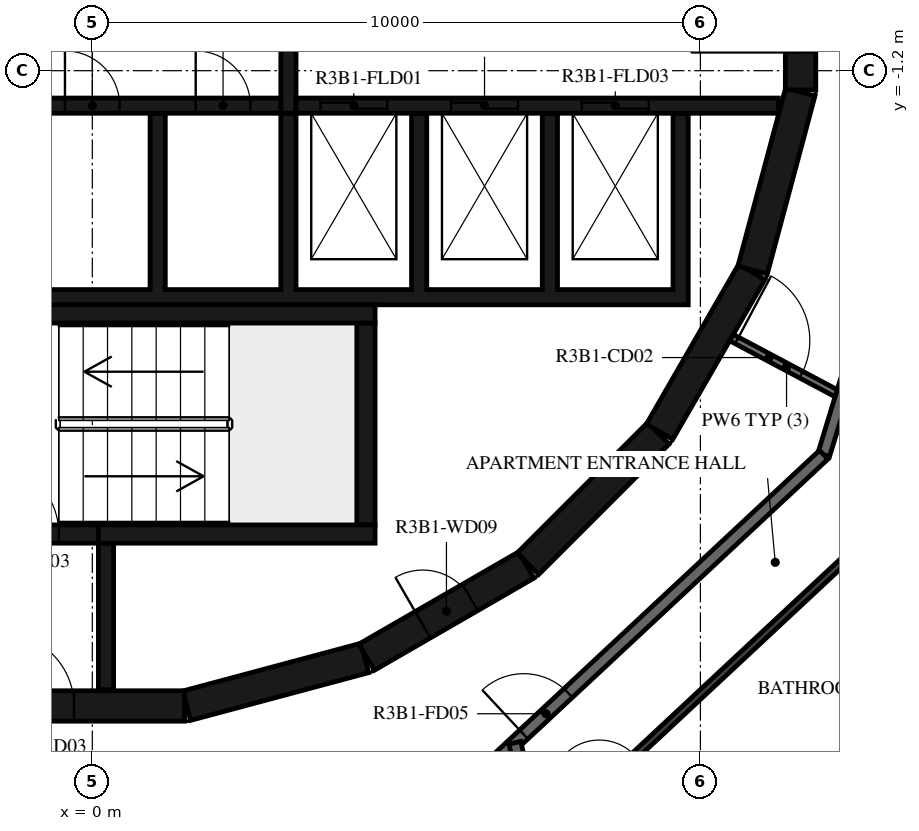
"""IFC4 building model, lengths in metres.
Left out: names, types, materials, properties, quantities, classifications, styles, units other than length and angle.
Written with IfcOpenShell. Run it as: python <this file> out.ifc"""

import sys

from ifc_helpers import new_model, si_unit, direction, frame, frame_2d, origin, place, context, subcontext, project, spatial, polyline, rectangle, outline, extrude, element, fill, save


model = new_model("IFC4")
c1 = context("Model", 3, precision=1e-05, world=origin(), true_north=direction((0.0, 1.0)))
c2 = subcontext(c1, "Body", "Model", "MODEL_VIEW")
j1 = project(units=[si_unit("LENGTHUNIT", "METRE"), si_unit("PLANEANGLEUNIT", "RADIAN")], contexts=[c1])
p1 = place(None, origin())
s1 = spatial("IfcSite", under=j1, at=p1, CompositionType="ELEMENT")
p2 = place(p1, origin())
s2 = spatial("IfcBuilding", under=s1, at=p2, CompositionType="ELEMENT")
p3 = place(p2, frame((0.0, 0.0, 123.9)))
s3 = spatial("IfcBuildingStorey", under=s2, at=p3, CompositionType="ELEMENT", Elevation=123.9)
p4 = place(p3, frame((1.55, -11.643, 0.0), z_axis=(0.0, 0.0, 1.0), x_axis=(0.965948410781, 0.258734743916, 0.0)))
e1 = element("IfcWall", 1, at=p4, inside=s3, PredefinedType="SHEAR", context=c2, shape_type="SweptSolid", body=[
    extrude(rectangle(XDim=3.033, YDim=0.5, at=frame_2d((1.516, 0.0))), origin(), (0.0, 0.0, 1.0), 3.12),
])
p5 = place(p3, frame((4.51, -10.845, 0.0), z_axis=(0.0, 0.0, 1.0), x_axis=(0.865975092491, 0.500087131594, 0.0)))
e2 = element("IfcWall", 2, at=p5, inside=s3, PredefinedType="SHEAR", context=c2, shape_type="SweptSolid", body=[
    extrude(rectangle(XDim=3.033, YDim=0.5, at=frame_2d((1.516, 0.0))), origin(), (0.0, 0.0, 1.0), 3.12),
])
p6 = place(p5, frame((1.066, 0.0, 0.0)))
e3 = element("IfcOpeningElement", 3, at=p6, cuts=e2, PredefinedType="OPENING", context=c2, shape_type="SweptSolid", body=[
    extrude(rectangle(XDim=0.9, YDim=2.1, at=frame_2d((0.45, 1.05))), frame((0.0, 0.26, 0.0), z_axis=(0.0, -1.0, 0.0), x_axis=(1.0, 0.0, 0.0)), (0.0, 0.0, 1.0), 0.52),
])
p7 = place(p3, frame((7.164, -9.308, 0.0), z_axis=(0.0, 0.0, 1.0), x_axis=(0.707106781187, 0.707106781187, 0.0)))
e4 = element("IfcWall", 4, at=p7, inside=s3, PredefinedType="SHEAR", context=c2, shape_type="SweptSolid", body=[
    extrude(rectangle(XDim=3.032, YDim=0.5, at=frame_2d((1.516, 0.0))), origin(), (0.0, 0.0, 1.0), 3.12),
])
for number, where, z_axis, x_axis in (
    (5, (9.329, -7.137, 0.0), (0.0, 0.0, 1.0), (0.5, 0.866, 0.0)),
    (6, (10.858, -4.479, 0.0), (0.0, 0.0, 1.0), (0.259, 0.966, 0.0)),
):
    element("IfcWall", number, at=place(p3, frame(where, z_axis=z_axis, x_axis=x_axis)), inside=s3, PredefinedType="SHEAR", context=c2, shape_type="SweptSolid", body=[
        extrude(rectangle(XDim=3.033, YDim=0.5, at=frame_2d((1.516, 0.0))), origin(), (0.0, 0.0, 1.0), 3.12),
    ])
p8 = place(p3, frame((11.647, -1.516, 0.0), z_axis=(0.0, 0.0, 1.0), x_axis=(0.0, 1.0, 0.0)))
e7 = element("IfcWall", 7, at=p8, inside=s3, PredefinedType="SHEAR", context=c2, shape_type="SweptSolid", body=[
    extrude(rectangle(XDim=3.033, YDim=0.5, at=frame_2d((1.516, 0.0))), origin(), (0.0, 0.0, 1.0), 3.12),
])
p9 = place(p8, frame((0.616, 0.0, 0.0)))
e8 = element("IfcOpeningElement", 8, at=p9, cuts=e7, PredefinedType="OPENING", context=c2, shape_type="SweptSolid", body=[
    extrude(rectangle(XDim=1.8, YDim=2.1, at=frame_2d((0.9, 1.05))), frame((0.0, 0.26, 0.0), z_axis=(0.0, -1.0, 0.0), x_axis=(1.0, 0.0, 0.0)), (0.0, 0.0, 1.0), 0.52),
])
p10 = place(p3, frame((-1.516, -11.647, 0.0), z_axis=(0.0, 0.0, 1.0), x_axis=(1.0, 0.0, 0.0)))
e9 = element("IfcWall", 9, at=p10, inside=s3, PredefinedType="SHEAR", context=c2, shape_type="SweptSolid", body=[
    extrude(rectangle(XDim=3.033, YDim=0.5, at=frame_2d((1.516, 0.0))), origin(), (0.0, 0.0, 1.0), 3.12),
])
p11 = place(p10, frame((0.016, 0.0, 0.0)))
e10 = element("IfcOpeningElement", 10, at=p11, cuts=e9, PredefinedType="OPENING", context=c2, shape_type="SweptSolid", body=[
    extrude(rectangle(XDim=1.2, YDim=2.1, at=frame_2d((0.6, 1.05))), frame((0.0, 0.26, 0.0), z_axis=(0.0, -1.0, 0.0), x_axis=(1.0, 0.0, 0.0)), (0.0, 0.0, 1.0), 0.52),
])
p12 = place(p3, frame((-2.4, -5.2, 0.0), z_axis=(0.0, 0.0, 1.0), x_axis=(1.0, 0.0, 0.0)))
e11 = element("IfcWall", 11, at=p12, inside=s3, PredefinedType="SHEAR", context=c2, shape_type="SweptSolid", body=[
    extrude(rectangle(XDim=7.05, YDim=0.3, at=frame_2d((3.525, 0.0))), origin(), (0.0, 0.0, 1.0), 3.12),
])
p13 = place(p3, frame((4.5, -8.67, 0.0), z_axis=(0.0, 0.0, 1.0), x_axis=(0.0, 1.0, 0.0)))
e12 = element("IfcWall", 12, at=p13, inside=s3, PredefinedType="SHEAR", context=c2, shape_type="SweptSolid", body=[
    extrude(rectangle(XDim=3.32, YDim=0.3, at=frame_2d((1.66, 0.0))), origin(), (0.0, 0.0, 1.0), 3.12),
])
p14 = place(p3, frame((0.1, -8.82, 0.0), z_axis=(0.0, 0.0, 1.0), x_axis=(1.0, 0.0, 0.0)))
e13 = element("IfcWall", 13, at=p14, inside=s3, PredefinedType="SHEAR", context=c2, shape_type="SweptSolid", body=[
    extrude(rectangle(XDim=4.55, YDim=0.3, at=frame_2d((2.275, 0.0))), origin(), (0.0, 0.0, 1.0), 3.12),
])
p15 = place(p3, frame((-2.4, -8.82, 0.0), z_axis=(0.0, 0.0, 1.0), x_axis=(1.0, 0.0, 0.0)))
e14 = element("IfcWall", 14, at=p15, inside=s3, PredefinedType="SHEAR", context=c2, shape_type="SweptSolid", body=[
    extrude(rectangle(XDim=2.5, YDim=0.3, at=frame_2d((1.25, 0.0))), origin(), (0.0, 0.0, 1.0), 3.12),
])
p16 = place(p15, frame((0.65, 0.0, 0.0)))
e15 = element("IfcOpeningElement", 15, at=p16, cuts=e14, PredefinedType="OPENING", context=c2, shape_type="SweptSolid", body=[
    extrude(rectangle(XDim=1.2, YDim=2.1, at=frame_2d((0.6, 1.05))), frame((0.0, 0.16, 0.0), z_axis=(0.0, -1.0, 0.0), x_axis=(1.0, 0.0, 0.0)), (0.0, 0.0, 1.0), 0.32),
])
p17 = place(p3, frame((0.225, -8.97, 0.0), z_axis=(0.0, 0.0, 1.0), x_axis=(0.0, -1.0, 0.0)))
e16 = element("IfcWall", 16, at=p17, inside=s3, PredefinedType="SHEAR", context=c2, shape_type="SweptSolid", body=[
    extrude(rectangle(XDim=2.41, YDim=0.25, at=frame_2d((1.205, 0.0))), origin(), (0.0, 0.0, 1.0), 3.12),
])
p18 = place(p3, origin())
e17 = element("IfcWall", 17, at=p18, inside=s3, PredefinedType="SHEAR", context=c2, shape_type="SweptSolid", body=[
    extrude(outline(polyline([(9.8, -5.05), (9.8, -4.8), (9.8, -1.9), (9.55, -1.9), (9.55, -4.8), (7.65, -4.8), (7.65, -1.9), (7.4, -1.9), (7.4, -4.8), (5.5, -4.8), (5.5, -1.9), (5.25, -1.9), (5.25, -4.8), (3.35, -4.8), (3.35, -1.9), (3.1, -1.9), (3.1, -4.8), (1.2, -4.8), (1.2, -1.9), (0.95, -1.9), (0.95, -4.8), (-0.95, -4.8), (-0.95, -1.9), (-1.2, -1.9), (-1.2, -4.8), (-5.25, -4.8), (-5.25, -1.9), (-5.5, -1.9), (-5.5, -4.8), (-7.4, -4.8), (-7.4, -1.9), (-7.65, -1.9), (-7.65, -4.8), (-9.55, -4.8), (-9.55, -1.9), (-9.8, -1.9), (-9.8, -4.8), (-9.8, -5.05), (9.8, -5.05)])), origin(), (0.0, 0.0, 1.0), 3.12),
])
p19 = place(p3, frame((-11.28, -1.775, 0.0), z_axis=(0.0, 0.0, 1.0), x_axis=(1.0, 0.0, 0.0)))
e18 = element("IfcWall", 18, at=p19, inside=s3, PredefinedType="SHEAR", context=c2, shape_type="SweptSolid", body=[
    extrude(rectangle(XDim=14.38, YDim=0.25, at=frame_2d((7.19, 0.0))), origin(), (0.0, 0.0, 1.0), 3.12),
])
p20 = place(p19, frame((7.605, 0.0, 0.0)))
e19 = element("IfcOpeningElement", 19, at=p20, cuts=e18, PredefinedType="OPENING", context=c2, shape_type="SweptSolid", body=[
    extrude(rectangle(XDim=0.9, YDim=2.1, at=frame_2d((0.45, 1.05))), frame((0.0, 0.135, 0.0), z_axis=(0.0, -1.0, 0.0), x_axis=(1.0, 0.0, 0.0)), (0.0, 0.0, 1.0), 0.27),
])
p21 = place(p19, frame((10.83, 0.0, 0.0)))
e20 = element("IfcOpeningElement", 20, at=p21, cuts=e18, PredefinedType="OPENING", context=c2, shape_type="SweptSolid", body=[
    extrude(rectangle(XDim=0.9, YDim=2.1, at=frame_2d((0.45, 1.05))), frame((0.0, 0.135, 0.0), z_axis=(0.0, -1.0, 0.0), x_axis=(1.0, 0.0, 0.0)), (0.0, 0.0, 1.0), 0.27),
])
p22 = place(p19, frame((12.98, 0.0, 0.0)))
e21 = element("IfcOpeningElement", 21, at=p22, cuts=e18, PredefinedType="OPENING", context=c2, shape_type="SweptSolid", body=[
    extrude(rectangle(XDim=0.9, YDim=2.1, at=frame_2d((0.45, 1.05))), frame((0.0, 0.135, 0.0), z_axis=(0.0, -1.0, 0.0), x_axis=(1.0, 0.0, 0.0)), (0.0, 0.0, 1.0), 0.27),
])
p23 = place(p3, frame((3.35, -1.775, 0.0), z_axis=(0.0, 0.0, 1.0), x_axis=(1.0, 0.0, 0.0)))
e22 = element("IfcWall", 22, at=p23, inside=s3, PredefinedType="SHEAR", context=c2, shape_type="SweptSolid", body=[
    extrude(rectangle(XDim=7.93, YDim=0.25, at=frame_2d((3.965, 0.0))), origin(), (0.0, 0.0, 1.0), 3.12),
])
p24 = place(p23, frame((0.4, 0.0, 0.0)))
e23 = element("IfcOpeningElement", 23, at=p24, cuts=e22, PredefinedType="OPENING", context=c2, shape_type="SweptSolid", body=[
    extrude(rectangle(XDim=1.1, YDim=2.4, at=frame_2d((0.55, 1.2))), frame((0.0, 0.135, 0.0), z_axis=(0.0, -1.0, 0.0), x_axis=(1.0, 0.0, 0.0)), (0.0, 0.0, 1.0), 0.27),
])
p25 = place(p23, frame((2.55, 0.0, 0.0)))
e24 = element("IfcOpeningElement", 24, at=p25, cuts=e22, PredefinedType="OPENING", context=c2, shape_type="SweptSolid", body=[
    extrude(rectangle(XDim=1.1, YDim=2.4, at=frame_2d((0.55, 1.2))), frame((0.0, 0.135, 0.0), z_axis=(0.0, -1.0, 0.0), x_axis=(1.0, 0.0, 0.0)), (0.0, 0.0, 1.0), 0.27),
])
p26 = place(p23, frame((4.7, 0.0, 0.0)))
e25 = element("IfcOpeningElement", 25, at=p26, cuts=e22, PredefinedType="OPENING", context=c2, shape_type="SweptSolid", body=[
    extrude(rectangle(XDim=1.1, YDim=2.4, at=frame_2d((0.55, 1.2))), frame((0.0, 0.135, 0.0), z_axis=(0.0, -1.0, 0.0), x_axis=(1.0, 0.0, 0.0)), (0.0, 0.0, 1.0), 0.27),
])
p27 = place(p3, frame((3.225, -1.9, 0.0), z_axis=(0.0, 0.0, 1.0), x_axis=(0.0, 1.0, 0.0)))
e26 = element("IfcWall", 26, at=p27, inside=s3, PredefinedType="SHEAR", context=c2, shape_type="SweptSolid", body=[
    extrude(rectangle(XDim=3.8, YDim=0.25, at=frame_2d((1.9, 0.0))), origin(), (0.0, 0.0, 1.0), 3.12),
])
p28 = place(p3, frame((10.511, -5.589, 0.0), z_axis=(0.0, 0.0, 1.0), x_axis=(0.882987820808, -0.469395897196, 0.0)))
e27 = element("IfcWall", 27, at=p28, inside=s3, PredefinedType="PARTITIONING", context=c2, shape_type="SweptSolid", body=[
    extrude(rectangle(XDim=2.052, YDim=0.12, at=frame_2d((1.026, 0.0))), origin(), (0.0, 0.0, 1.0), 3.12),
])
p29 = place(p28, frame((0.1, 0.0, 0.0)))
e28 = element("IfcOpeningElement", 28, at=p29, cuts=e27, PredefinedType="OPENING", context=c2, shape_type="SweptSolid", body=[
    extrude(rectangle(XDim=1.2, YDim=2.1, at=frame_2d((0.6, 1.05))), frame((0.0, 0.07, 0.0), z_axis=(0.0, -1.0, 0.0), x_axis=(1.0, 0.0, 0.0)), (0.0, 0.0, 1.0), 0.14),
])
p30 = place(p3, frame((12.028, -7.516, 0.0), z_axis=(0.0, 0.0, 1.0), x_axis=(0.292365533182, 0.956306642771, 0.0)))
e29 = element("IfcWall", 29, at=p30, inside=s3, PredefinedType="STANDARD", context=c2, shape_type="SweptSolid", body=[
    extrude(rectangle(XDim=7.342, YDim=0.2, at=frame_2d((3.671, 0.0))), origin(), (0.0, 0.0, 1.0), 3.12),
])
p31 = place(p3, frame((-7.516, -12.028, 0.0), z_axis=(0.0, 0.0, 1.0), x_axis=(0.956306642771, -0.292365533182, 0.0)))
e30 = element("IfcWall", 30, at=p31, inside=s3, PredefinedType="STANDARD", context=c2, shape_type="SweptSolid", body=[
    extrude(rectangle(XDim=7.342, YDim=0.2, at=frame_2d((3.671, 0.0))), origin(), (0.0, 0.0, 1.0), 3.12),
])
p32 = place(p31, frame((6.142, 0.0, 0.0)))
e31 = element("IfcOpeningElement", 31, at=p32, cuts=e30, PredefinedType="OPENING", context=c2, shape_type="SweptSolid", body=[
    extrude(rectangle(XDim=1.0, YDim=2.1, at=frame_2d((0.5, 1.05))), frame((0.0, 0.11, 0.0), z_axis=(0.0, -1.0, 0.0), x_axis=(1.0, 0.0, 0.0)), (0.0, 0.0, 1.0), 0.22),
])
p33 = place(p3, frame((6.659, -12.523, 0.0), z_axis=(0.0, 0.0, 1.0), x_axis=(0.731350455479, 0.682001841105, 0.0)))
e32 = element("IfcWall", 32, at=p33, inside=s3, PredefinedType="STANDARD", context=c2, shape_type="SweptSolid", body=[
    extrude(rectangle(XDim=7.342, YDim=0.2, at=frame_2d((3.671, 0.0))), origin(), (0.0, 0.0, 1.0), 3.12),
])
p34 = place(p33, frame((0.597, 0.0, 0.0)))
e33 = element("IfcOpeningElement", 33, at=p34, cuts=e32, PredefinedType="OPENING", context=c2, shape_type="SweptSolid", body=[
    extrude(rectangle(XDim=1.0, YDim=2.1, at=frame_2d((0.5, 1.05))), frame((0.0, 0.11, 0.0), z_axis=(0.0, -1.0, 0.0), x_axis=(1.0, 0.0, 0.0)), (0.0, 0.0, 1.0), 0.22),
])
p35 = place(p3, frame((7.34, -13.946, 0.0), z_axis=(0.0, 0.0, 1.0), x_axis=(-0.224849249613, 0.974393562658, 0.0)))
e34 = element("IfcWall", 34, at=p35, inside=s3, PredefinedType="STANDARD", context=c2, shape_type="SweptSolid", body=[
    extrude(rectangle(XDim=1.738, YDim=0.2, at=frame_2d((0.869, 0.0))), origin(), (0.0, 0.0, 1.0), 3.12),
])
p36 = place(p3, frame((-13.939, -18.911, 0.0), z_axis=(0.0, 0.0, 1.0), x_axis=(0.974369607456, 0.224953035245, 0.0)))
e35 = element("IfcWall", 35, at=p36, inside=s3, PredefinedType="PARTITIONING", context=c2, shape_type="SweptSolid", body=[
    extrude(rectangle(XDim=33.934, YDim=0.12, at=frame_2d((16.967, 0.0))), origin(), (0.0, 0.0, 1.0), 3.12),
])
p37 = place(p36, frame((2.0, 0.0, 0.0)))
e36 = element("IfcOpeningElement", 36, at=p37, cuts=e35, PredefinedType="OPENING", context=c2, shape_type="SweptSolid", body=[
    extrude(rectangle(XDim=0.9, YDim=2.1, at=frame_2d((0.45, 1.05))), frame((0.0, 0.07, 0.0), z_axis=(0.0, -1.0, 0.0), x_axis=(1.0, 0.0, 0.0)), (0.0, 0.0, 1.0), 0.14),
])
p38 = place(p36, frame((28.154, 0.0, 0.0)))
e37 = element("IfcOpeningElement", 37, at=p38, cuts=e35, PredefinedType="OPENING", context=c2, shape_type="SweptSolid", body=[
    extrude(rectangle(XDim=0.9, YDim=2.1, at=frame_2d((0.45, 1.05))), frame((0.0, 0.07, 0.0), z_axis=(0.0, -1.0, 0.0), x_axis=(1.0, 0.0, 0.0)), (0.0, 0.0, 1.0), 0.14),
])
p39 = place(p36, frame((30.039, 0.0, 0.0)))
e38 = element("IfcOpeningElement", 38, at=p39, cuts=e35, PredefinedType="OPENING", context=c2, shape_type="SweptSolid", body=[
    extrude(rectangle(XDim=0.9, YDim=2.1, at=frame_2d((0.45, 1.05))), frame((0.0, 0.07, 0.0), z_axis=(0.0, -1.0, 0.0), x_axis=(1.0, 0.0, 0.0)), (0.0, 0.0, 1.0), 0.14),
])
p40 = place(p3, frame((7.388, -13.894, 0.0), z_axis=(0.0, 0.0, 1.0), x_axis=(0.731346321845, 0.682006273815, 0.0)))
e39 = element("IfcWall", 39, at=p40, inside=s3, PredefinedType="PARTITIONING", context=c2, shape_type="SweptSolid", body=[
    extrude(rectangle(XDim=7.585, YDim=0.12, at=frame_2d((3.793, 0.0))), origin(), (0.0, 0.0, 1.0), 3.12),
])
p41 = place(p40, frame((1.3, 0.0, 0.0)))
e40 = element("IfcOpeningElement", 40, at=p41, cuts=e39, PredefinedType="OPENING", context=c2, shape_type="SweptSolid", body=[
    extrude(rectangle(XDim=0.8, YDim=2.1, at=frame_2d((0.4, 1.05))), frame((0.0, 0.07, 0.0), z_axis=(0.0, -1.0, 0.0), x_axis=(1.0, 0.0, 0.0)), (0.0, 0.0, 1.0), 0.14),
])
p42 = place(p16, origin())
e41 = element("IfcDoor", 41, at=p42, inside=s3, OperationType="SINGLE_SWING_LEFT", PredefinedType="DOOR", context=c2, shape_type="SweptSolid", body=[
    extrude(rectangle(XDim=1.2, YDim=2.1, at=frame_2d((0.6, 1.05))), frame((0.0, 0.025, 0.0), z_axis=(0.0, -1.0, 0.0), x_axis=(1.0, 0.0, 0.0)), (0.0, 0.0, 1.0), 0.05),
])
fill(e15, e41)
p43 = place(p11, origin())
e42 = element("IfcDoor", 42, at=p43, inside=s3, OperationType="SINGLE_SWING_RIGHT", PredefinedType="DOOR", context=c2, shape_type="SweptSolid", body=[
    extrude(rectangle(XDim=1.2, YDim=2.1, at=frame_2d((0.6, 1.05))), frame((0.0, 0.025, 0.0), z_axis=(0.0, -1.0, 0.0), x_axis=(1.0, 0.0, 0.0)), (0.0, 0.0, 1.0), 0.05),
])
fill(e10, e42)
p44 = place(p9, origin())
e43 = element("IfcDoor", 43, at=p44, inside=s3, OperationType="DOUBLE_DOOR_SINGLE_SWING", PredefinedType="DOOR", context=c2, shape_type="SweptSolid", body=[
    extrude(rectangle(XDim=1.8, YDim=2.1, at=frame_2d((0.9, 1.05))), frame((0.0, 0.025, 0.0), z_axis=(0.0, -1.0, 0.0), x_axis=(1.0, 0.0, 0.0)), (0.0, 0.0, 1.0), 0.05),
])
fill(e8, e43)
p45 = place(p24, origin())
e44 = element("IfcDoor", 44, at=p45, inside=s3, OperationType="DOUBLE_DOOR_SLIDING", PredefinedType="DOOR", context=c2, shape_type="SweptSolid", body=[
    extrude(rectangle(XDim=1.1, YDim=2.4, at=frame_2d((0.55, 1.2))), frame((0.0, 0.025, 0.0), z_axis=(0.0, -1.0, 0.0), x_axis=(1.0, 0.0, 0.0)), (0.0, 0.0, 1.0), 0.05),
])
fill(e23, e44)
p46 = place(p25, origin())
e45 = element("IfcDoor", 45, at=p46, inside=s3, OperationType="DOUBLE_DOOR_SLIDING", PredefinedType="DOOR", context=c2, shape_type="SweptSolid", body=[
    extrude(rectangle(XDim=1.1, YDim=2.4, at=frame_2d((0.55, 1.2))), frame((0.0, 0.025, 0.0), z_axis=(0.0, -1.0, 0.0), x_axis=(1.0, 0.0, 0.0)), (0.0, 0.0, 1.0), 0.05),
])
fill(e24, e45)
p47 = place(p26, origin())
e46 = element("IfcDoor", 46, at=p47, inside=s3, OperationType="DOUBLE_DOOR_SLIDING", PredefinedType="DOOR", context=c2, shape_type="SweptSolid", body=[
    extrude(rectangle(XDim=1.1, YDim=2.4, at=frame_2d((0.55, 1.2))), frame((0.0, 0.025, 0.0), z_axis=(0.0, -1.0, 0.0), x_axis=(1.0, 0.0, 0.0)), (0.0, 0.0, 1.0), 0.05),
])
fill(e25, e46)
p48 = place(p21, origin())
e47 = element("IfcDoor", 47, at=p48, inside=s3, OperationType="SINGLE_SWING_LEFT", PredefinedType="DOOR", context=c2, shape_type="SweptSolid", body=[
    extrude(rectangle(XDim=0.9, YDim=2.1, at=frame_2d((0.45, 1.05))), frame((0.0, 0.025, 0.0), z_axis=(0.0, -1.0, 0.0), x_axis=(1.0, 0.0, 0.0)), (0.0, 0.0, 1.0), 0.05),
])
fill(e20, e47)
p49 = place(p22, origin())
e48 = element("IfcDoor", 48, at=p49, inside=s3, OperationType="SINGLE_SWING_RIGHT", PredefinedType="DOOR", context=c2, shape_type="SweptSolid", body=[
    extrude(rectangle(XDim=0.9, YDim=2.1, at=frame_2d((0.45, 1.05))), frame((0.0, 0.025, 0.0), z_axis=(0.0, -1.0, 0.0), x_axis=(1.0, 0.0, 0.0)), (0.0, 0.0, 1.0), 0.05),
])
fill(e21, e48)
p50 = place(p6, origin())
e49 = element("IfcDoor", 49, at=p50, inside=s3, OperationType="SINGLE_SWING_RIGHT", PredefinedType="DOOR", context=c2, shape_type="SweptSolid", body=[
    extrude(rectangle(XDim=0.9, YDim=2.1, at=frame_2d((0.45, 1.05))), frame((0.0, 0.025, 0.0), z_axis=(0.0, -1.0, 0.0), x_axis=(1.0, 0.0, 0.0)), (0.0, 0.0, 1.0), 0.05),
])
fill(e3, e49)
p51 = place(p34, origin())
e50 = element("IfcDoor", 50, at=p51, inside=s3, OperationType="SINGLE_SWING_RIGHT", PredefinedType="DOOR", context=c2, shape_type="SweptSolid", body=[
    extrude(rectangle(XDim=1.0, YDim=2.1, at=frame_2d((0.5, 1.05))), frame((0.0, 0.025, 0.0), z_axis=(0.0, -1.0, 0.0), x_axis=(1.0, 0.0, 0.0)), (0.0, 0.0, 1.0), 0.05),
])
fill(e33, e50)
p52 = place(p29, origin())
e51 = element("IfcDoor", 51, at=p52, inside=s3, OperationType="DOUBLE_DOOR_SINGLE_SWING", PredefinedType="DOOR", context=c2, shape_type="SweptSolid", body=[
    extrude(rectangle(XDim=1.2, YDim=2.1, at=frame_2d((0.6, 1.05))), frame((0.0, 0.025, 0.0), z_axis=(0.0, -1.0, 0.0), x_axis=(1.0, 0.0, 0.0)), (0.0, 0.0, 1.0), 0.05),
])
fill(e28, e51)
save(model, sys.argv[1])
